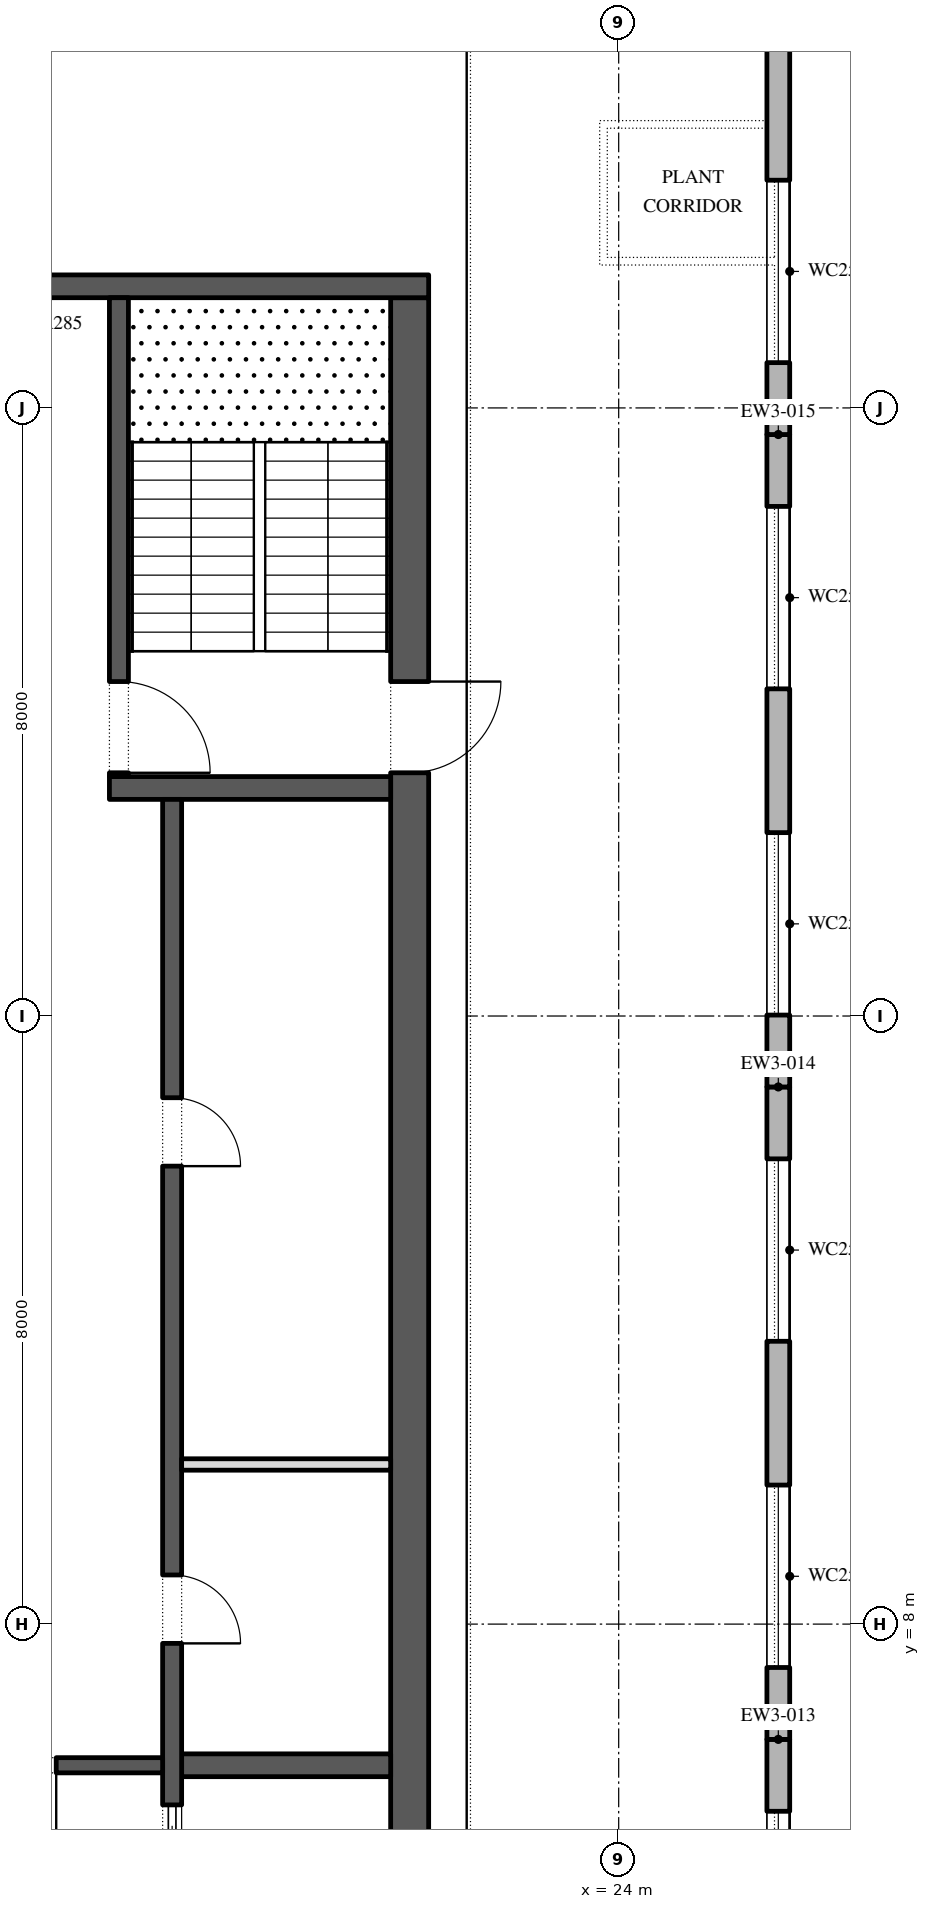
"""IFC4 building model, lengths in metres.
Left out: names, types, materials, properties, quantities, classifications, styles, units other than length and angle.
Written with IfcOpenShell. Run it as: python <this file> out.ifc"""

import sys

from ifc_helpers import new_model, si_unit, direction, frame, frame_2d, origin, place, context, subcontext, project, spatial, polyline, rectangle, outline, extrude, element, fill, save


model = new_model("IFC4")
c1 = context("Model", 3, precision=1e-05, world=origin(), true_north=direction((0.0, 1.0)))
c2 = subcontext(c1, "Body", "Model", "MODEL_VIEW")
j1 = project(units=[si_unit("LENGTHUNIT", "METRE"), si_unit("PLANEANGLEUNIT", "RADIAN")], contexts=[c1])
p1 = place(None, origin())
s1 = spatial("IfcSite", under=j1, at=p1, CompositionType="ELEMENT")
p2 = place(p1, origin())
s2 = spatial("IfcBuilding", under=s1, at=p2, CompositionType="ELEMENT")
p3 = place(p2, frame((0.0, 0.0, 373.2)))
s3 = spatial("IfcBuildingStorey", under=s2, at=p3, CompositionType="ELEMENT", Elevation=373.2)
p4 = place(p3, frame((26.1, -2.1, 0.0), z_axis=(0.0, 0.0, 1.0), x_axis=(0.0, 1.0, 0.0)))
e1 = element("IfcWall", 1, at=p4, inside=s3, PredefinedType="STANDARD", context=c2, shape_type="SweptSolid", body=[
    extrude(rectangle(XDim=8.583, YDim=0.3, at=frame_2d((4.292, 0.0))), origin(), (0.0, 0.0, 1.0), 4.0),
])
p5 = place(p4, frame((0.946, 0.0, 0.8)))
e2 = element("IfcOpeningElement", 2, at=p5, cuts=e1, PredefinedType="OPENING", context=c2, shape_type="SweptSolid", body=[
    extrude(outline(polyline([(0.0, 0.0), (2.4, 0.0), (2.4, 1.25), (2.377, 1.488), (2.31, 1.717), (2.2, 1.929), (2.051, 2.116), (1.87, 2.272), (1.663, 2.391), (1.437, 2.468), (1.2, 2.5), (0.963, 2.468), (0.737, 2.391), (0.53, 2.272), (0.349, 2.116), (0.2, 1.929), (0.09, 1.717), (0.023, 1.488), (0.0, 1.25), (0.0, 0.0)])), frame((0.0, 0.16, 0.0), z_axis=(0.0, -1.0, 0.0), x_axis=(1.0, 0.0, 0.0)), (0.0, 0.0, 1.0), 0.32),
])
p6 = place(p4, frame((5.238, 0.0, 0.8)))
e3 = element("IfcOpeningElement", 3, at=p6, cuts=e1, PredefinedType="OPENING", context=c2, shape_type="SweptSolid", body=[
    extrude(outline(polyline([(0.0, 0.0), (2.4, 0.0), (2.4, 1.25), (2.377, 1.488), (2.31, 1.717), (2.2, 1.929), (2.051, 2.116), (1.87, 2.272), (1.663, 2.391), (1.437, 2.468), (1.2, 2.5), (0.963, 2.468), (0.737, 2.391), (0.53, 2.272), (0.349, 2.116), (0.2, 1.929), (0.09, 1.717), (0.023, 1.488), (0.0, 1.25), (0.0, 0.0)])), frame((0.0, 0.16, 0.0), z_axis=(0.0, -1.0, 0.0), x_axis=(1.0, 0.0, 0.0)), (0.0, 0.0, 1.0), 0.32),
])
p7 = place(p3, frame((26.1, 6.483, 0.0), z_axis=(0.0, 0.0, 1.0), x_axis=(0.0, 1.0, 0.0)))
e4 = element("IfcWall", 4, at=p7, inside=s3, PredefinedType="STANDARD", context=c2, shape_type="SweptSolid", body=[
    extrude(rectangle(XDim=8.583, YDim=0.3, at=frame_2d((4.292, 0.0))), origin(), (0.0, 0.0, 1.0), 4.0),
])
p8 = place(p7, frame((0.946, 0.0, 0.8)))
e5 = element("IfcOpeningElement", 5, at=p8, cuts=e4, PredefinedType="OPENING", context=c2, shape_type="SweptSolid", body=[
    extrude(outline(polyline([(0.0, 0.0), (2.4, 0.0), (2.4, 1.25), (2.377, 1.488), (2.31, 1.717), (2.2, 1.929), (2.051, 2.116), (1.87, 2.272), (1.663, 2.391), (1.437, 2.468), (1.2, 2.5), (0.963, 2.468), (0.737, 2.391), (0.53, 2.272), (0.349, 2.116), (0.2, 1.929), (0.09, 1.717), (0.023, 1.488), (0.0, 1.25), (0.0, 0.0)])), frame((0.0, 0.16, 0.0), z_axis=(0.0, -1.0, 0.0), x_axis=(1.0, 0.0, 0.0)), (0.0, 0.0, 1.0), 0.32),
])
p9 = place(p7, frame((5.238, 0.0, 0.8)))
e6 = element("IfcOpeningElement", 6, at=p9, cuts=e4, PredefinedType="OPENING", context=c2, shape_type="SweptSolid", body=[
    extrude(outline(polyline([(0.0, 0.0), (2.4, 0.0), (2.4, 1.25), (2.377, 1.488), (2.31, 1.717), (2.2, 1.929), (2.051, 2.116), (1.87, 2.272), (1.663, 2.391), (1.437, 2.468), (1.2, 2.5), (0.963, 2.468), (0.737, 2.391), (0.53, 2.272), (0.349, 2.116), (0.2, 1.929), (0.09, 1.717), (0.023, 1.488), (0.0, 1.25), (0.0, 0.0)])), frame((0.0, 0.16, 0.0), z_axis=(0.0, -1.0, 0.0), x_axis=(1.0, 0.0, 0.0)), (0.0, 0.0, 1.0), 0.32),
])
p10 = place(p3, frame((26.1, 15.067, 0.0), z_axis=(0.0, 0.0, 1.0), x_axis=(0.0, 1.0, 0.0)))
e7 = element("IfcWall", 7, at=p10, inside=s3, PredefinedType="STANDARD", context=c2, shape_type="SweptSolid", body=[
    extrude(rectangle(XDim=8.583, YDim=0.3, at=frame_2d((4.292, 0.0))), origin(), (0.0, 0.0, 1.0), 4.0),
])
p11 = place(p10, frame((0.946, 0.0, 0.8)))
e8 = element("IfcOpeningElement", 8, at=p11, cuts=e7, PredefinedType="OPENING", context=c2, shape_type="SweptSolid", body=[
    extrude(outline(polyline([(0.0, 0.0), (2.4, 0.0), (2.4, 1.25), (2.377, 1.488), (2.31, 1.717), (2.2, 1.929), (2.051, 2.116), (1.87, 2.272), (1.663, 2.391), (1.437, 2.468), (1.2, 2.5), (0.963, 2.468), (0.737, 2.391), (0.53, 2.272), (0.349, 2.116), (0.2, 1.929), (0.09, 1.717), (0.023, 1.488), (0.0, 1.25), (0.0, 0.0)])), frame((0.0, 0.16, 0.0), z_axis=(0.0, -1.0, 0.0), x_axis=(1.0, 0.0, 0.0)), (0.0, 0.0, 1.0), 0.32),
])
p12 = place(p10, frame((5.238, 0.0, 0.8)))
e9 = element("IfcOpeningElement", 9, at=p12, cuts=e7, PredefinedType="OPENING", context=c2, shape_type="SweptSolid", body=[
    extrude(outline(polyline([(0.0, 0.0), (2.4, 0.0), (2.4, 1.25), (2.377, 1.488), (2.31, 1.717), (2.2, 1.929), (2.051, 2.116), (1.87, 2.272), (1.663, 2.391), (1.437, 2.468), (1.2, 2.5), (0.963, 2.468), (0.737, 2.391), (0.53, 2.272), (0.349, 2.116), (0.2, 1.929), (0.09, 1.717), (0.023, 1.488), (0.0, 1.25), (0.0, 0.0)])), frame((0.0, 0.16, 0.0), z_axis=(0.0, -1.0, 0.0), x_axis=(1.0, 0.0, 0.0)), (0.0, 0.0, 1.0), 0.32),
])
p13 = place(p3, frame((26.1, 23.65, 0.0), z_axis=(0.0, 0.0, 1.0), x_axis=(0.0, 1.0, 0.0)))
e10 = element("IfcWall", 10, at=p13, inside=s3, PredefinedType="STANDARD", context=c2, shape_type="SweptSolid", body=[
    extrude(rectangle(XDim=8.583, YDim=0.3, at=frame_2d((4.292, 0.0))), origin(), (0.0, 0.0, 1.0), 4.0),
])
p14 = place(p13, frame((0.946, 0.0, 0.8)))
e11 = element("IfcOpeningElement", 11, at=p14, cuts=e10, PredefinedType="OPENING", context=c2, shape_type="SweptSolid", body=[
    extrude(outline(polyline([(0.0, 0.0), (2.4, 0.0), (2.4, 1.25), (2.377, 1.488), (2.31, 1.717), (2.2, 1.929), (2.051, 2.116), (1.87, 2.272), (1.663, 2.391), (1.437, 2.468), (1.2, 2.5), (0.963, 2.468), (0.737, 2.391), (0.53, 2.272), (0.349, 2.116), (0.2, 1.929), (0.09, 1.717), (0.023, 1.488), (0.0, 1.25), (0.0, 0.0)])), frame((0.0, 0.16, 0.0), z_axis=(0.0, -1.0, 0.0), x_axis=(1.0, 0.0, 0.0)), (0.0, 0.0, 1.0), 0.32),
])
p15 = place(p13, frame((5.238, 0.0, 0.8)))
e12 = element("IfcOpeningElement", 12, at=p15, cuts=e10, PredefinedType="OPENING", context=c2, shape_type="SweptSolid", body=[
    extrude(outline(polyline([(0.0, 0.0), (2.4, 0.0), (2.4, 1.25), (2.377, 1.488), (2.31, 1.717), (2.2, 1.929), (2.051, 2.116), (1.87, 2.272), (1.663, 2.391), (1.437, 2.468), (1.2, 2.5), (0.963, 2.468), (0.737, 2.391), (0.53, 2.272), (0.349, 2.116), (0.2, 1.929), (0.09, 1.717), (0.023, 1.488), (0.0, 1.25), (0.0, 0.0)])), frame((0.0, 0.16, 0.0), z_axis=(0.0, -1.0, 0.0), x_axis=(1.0, 0.0, 0.0)), (0.0, 0.0, 1.0), 0.32),
])
p16 = place(p3, frame((21.25, -2.45, 0.0), z_axis=(0.0, 0.0, 1.0), x_axis=(0.0, 1.0, 0.0)))
e13 = element("IfcWall", 13, at=p16, inside=s3, PredefinedType="SHEAR", context=c2, shape_type="SweptSolid", body=[
    extrude(rectangle(XDim=27.9, YDim=0.5, at=frame_2d((13.95, 0.0))), origin(), (0.0, 0.0, 1.0), 4.0),
])
p17 = place(p16, frame((5.05, 0.0, 0.0)))
e14 = element("IfcOpeningElement", 14, at=p17, cuts=e13, PredefinedType="OPENING", context=c2, shape_type="SweptSolid", body=[
    extrude(rectangle(XDim=1.2, YDim=2.1, at=frame_2d((0.6, 1.05))), frame((0.0, 0.26, 0.0), z_axis=(0.0, -1.0, 0.0), x_axis=(1.0, 0.0, 0.0)), (0.0, 0.0, 1.0), 0.52),
])
p18 = place(p16, frame((21.65, 0.0, 0.0)))
e15 = element("IfcOpeningElement", 15, at=p18, cuts=e13, PredefinedType="OPENING", context=c2, shape_type="SweptSolid", body=[
    extrude(rectangle(XDim=1.2, YDim=2.1, at=frame_2d((0.6, 1.05))), frame((0.0, 0.26, 0.0), z_axis=(0.0, -1.0, 0.0), x_axis=(1.0, 0.0, 0.0)), (0.0, 0.0, 1.0), 0.52),
])
p19 = place(p3, frame((10.5, 25.6, 0.0), z_axis=(0.0, 0.0, 1.0), x_axis=(1.0, 0.0, 0.0)))
e16 = element("IfcWall", 16, at=p19, inside=s3, PredefinedType="SHEAR", context=c2, shape_type="SweptSolid", body=[
    extrude(rectangle(XDim=11.0, YDim=0.3, at=frame_2d((5.5, 0.0))), origin(), (0.0, 0.0, 1.0), 4.0),
])
p20 = place(p3, frame((17.3, 19.0, 0.0), z_axis=(0.0, 0.0, 1.0), x_axis=(1.0, 0.0, 0.0)))
e17 = element("IfcWall", 17, at=p20, inside=s3, PredefinedType="SHEAR", context=c2, shape_type="SweptSolid", body=[
    extrude(rectangle(XDim=3.7, YDim=0.3, at=frame_2d((1.85, 0.0))), origin(), (0.0, 0.0, 1.0), 4.0),
])
p21 = place(p3, frame((17.425, 19.15, 0.0), z_axis=(0.0, 0.0, 1.0), x_axis=(0.0, 1.0, 0.0)))
e18 = element("IfcWall", 18, at=p21, inside=s3, PredefinedType="SHEAR", context=c2, shape_type="SweptSolid", body=[
    extrude(rectangle(XDim=6.3, YDim=0.25, at=frame_2d((3.15, 0.0))), origin(), (0.0, 0.0, 1.0), 4.0),
])
p22 = place(p21, frame((0.05, 0.0, 0.0)))
e19 = element("IfcOpeningElement", 19, at=p22, cuts=e18, PredefinedType="OPENING", context=c2, shape_type="SweptSolid", body=[
    extrude(rectangle(XDim=1.2, YDim=2.1, at=frame_2d((0.6, 1.05))), frame((0.0, 0.135, 0.0), z_axis=(0.0, -1.0, 0.0), x_axis=(1.0, 0.0, 0.0)), (0.0, 0.0, 1.0), 0.27),
])
p23 = place(p3, frame((18.25, 6.143, 0.0), z_axis=(0.0, 0.0, 1.0), x_axis=(1.0, 0.0, 0.0)))
e20 = element("IfcWall", 20, at=p23, inside=s3, PredefinedType="SHEAR", context=c2, shape_type="SweptSolid", body=[
    extrude(rectangle(XDim=2.75, YDim=0.3, at=frame_2d((1.375, 0.0))), origin(), (0.0, 0.0, 1.0), 4.0),
])
p24 = place(p3, frame((18.125, 4.15, 0.0), z_axis=(0.0, 0.0, 1.0), x_axis=(0.0, 1.0, 0.0)))
e21 = element("IfcWall", 21, at=p24, inside=s3, PredefinedType="SHEAR", context=c2, shape_type="SweptSolid", body=[
    extrude(rectangle(XDim=14.7, YDim=0.25, at=frame_2d((7.35, 0.0))), origin(), (0.0, 0.0, 1.0), 4.0),
])
p25 = place(p24, frame((3.596, 0.0, 0.0)))
e22 = element("IfcOpeningElement", 22, at=p25, cuts=e21, PredefinedType="OPENING", context=c2, shape_type="SweptSolid", body=[
    extrude(rectangle(XDim=0.9, YDim=2.1, at=frame_2d((0.45, 1.05))), frame((0.0, 0.135, 0.0), z_axis=(0.0, -1.0, 0.0), x_axis=(1.0, 0.0, 0.0)), (0.0, 0.0, 1.0), 0.27),
])
p26 = place(p24, frame((9.875, 0.0, 0.0)))
e23 = element("IfcOpeningElement", 23, at=p26, cuts=e21, PredefinedType="OPENING", context=c2, shape_type="SweptSolid", body=[
    extrude(rectangle(XDim=0.9, YDim=2.1, at=frame_2d((0.45, 1.05))), frame((0.0, 0.135, 0.0), z_axis=(0.0, -1.0, 0.0), x_axis=(1.0, 0.0, 0.0)), (0.0, 0.0, 1.0), 0.27),
])
p27 = place(p24, frame((0.371, 0.0, 0.0)))
e24 = element("IfcOpeningElement", 24, at=p27, cuts=e21, PredefinedType="OPENING", context=c2, shape_type="SweptSolid", body=[
    extrude(rectangle(XDim=1.1, YDim=2.1, at=frame_2d((0.55, 1.05))), frame((0.0, 0.135, 0.0), z_axis=(0.0, -1.0, 0.0), x_axis=(1.0, 0.0, 0.0)), (0.0, 0.0, 1.0), 0.27),
])
p28 = place(p3, frame((18.25, 10.1, 0.0), z_axis=(0.0, 0.0, 1.0), x_axis=(1.0, 0.0, 0.0)))
e25 = element("IfcWall", 25, at=p28, inside=s3, PredefinedType="PARTITIONING", context=c2, shape_type="SweptSolid", body=[
    extrude(rectangle(XDim=2.75, YDim=0.15, at=frame_2d((1.375, 0.0))), origin(), (0.0, 0.0, 1.0), 4.0),
])
p29 = place(p3, frame((14.0, 6.143, 0.0), z_axis=(0.0, 0.0, 1.0), x_axis=(1.0, 0.0, 0.0)))
e26 = element("IfcWall", 26, at=p29, inside=s3, PredefinedType="SHEAR", context=c2, shape_type="SweptSolid", body=[
    extrude(rectangle(XDim=4.0, YDim=0.2, at=frame_2d((2.0, 0.0))), origin(), (0.0, 0.0, 1.0), 4.0),
])
p30 = place(p29, frame((1.4, 0.0, 0.0)))
e27 = element("IfcOpeningElement", 27, at=p30, cuts=e26, PredefinedType="OPENING", context=c2, shape_type="SweptSolid", body=[
    extrude(rectangle(XDim=1.2, YDim=2.1, at=frame_2d((0.6, 1.05))), frame((0.0, 0.11, 0.0), z_axis=(0.0, -1.0, 0.0), x_axis=(1.0, 0.0, 0.0)), (0.0, 0.0, 1.0), 0.22),
])
p31 = place(p6, origin())
e28 = element("IfcWindow", 28, at=p31, inside=s3, PartitioningType="DOUBLE_PANEL_VERTICAL", PredefinedType="WINDOW", context=c2, shape_type="SweptSolid", body=[
    extrude(outline(polyline([(0.0, 0.0), (2.4, 0.0), (2.4, 1.25), (2.377, 1.488), (2.31, 1.717), (2.2, 1.929), (2.051, 2.116), (1.87, 2.272), (1.663, 2.391), (1.437, 2.468), (1.2, 2.5), (0.963, 2.468), (0.737, 2.391), (0.53, 2.272), (0.349, 2.116), (0.2, 1.929), (0.09, 1.717), (0.023, 1.488), (0.0, 1.25), (0.0, 0.0)])), frame((0.0, 0.03, 0.0), z_axis=(0.0, -1.0, 0.0), x_axis=(1.0, 0.0, 0.0)), (0.0, 0.0, 1.0), 0.06),
])
fill(e3, e28)
p32 = place(p8, origin())
e29 = element("IfcWindow", 29, at=p32, inside=s3, PartitioningType="DOUBLE_PANEL_VERTICAL", PredefinedType="WINDOW", context=c2, shape_type="SweptSolid", body=[
    extrude(outline(polyline([(0.0, 0.0), (2.4, 0.0), (2.4, 1.25), (2.377, 1.488), (2.31, 1.717), (2.2, 1.929), (2.051, 2.116), (1.87, 2.272), (1.663, 2.391), (1.437, 2.468), (1.2, 2.5), (0.963, 2.468), (0.737, 2.391), (0.53, 2.272), (0.349, 2.116), (0.2, 1.929), (0.09, 1.717), (0.023, 1.488), (0.0, 1.25), (0.0, 0.0)])), frame((0.0, 0.03, 0.0), z_axis=(0.0, -1.0, 0.0), x_axis=(1.0, 0.0, 0.0)), (0.0, 0.0, 1.0), 0.06),
])
fill(e5, e29)
p33 = place(p9, origin())
e30 = element("IfcWindow", 30, at=p33, inside=s3, PartitioningType="DOUBLE_PANEL_VERTICAL", PredefinedType="WINDOW", context=c2, shape_type="SweptSolid", body=[
    extrude(outline(polyline([(0.0, 0.0), (2.4, 0.0), (2.4, 1.25), (2.377, 1.488), (2.31, 1.717), (2.2, 1.929), (2.051, 2.116), (1.87, 2.272), (1.663, 2.391), (1.437, 2.468), (1.2, 2.5), (0.963, 2.468), (0.737, 2.391), (0.53, 2.272), (0.349, 2.116), (0.2, 1.929), (0.09, 1.717), (0.023, 1.488), (0.0, 1.25), (0.0, 0.0)])), frame((0.0, 0.03, 0.0), z_axis=(0.0, -1.0, 0.0), x_axis=(1.0, 0.0, 0.0)), (0.0, 0.0, 1.0), 0.06),
])
fill(e6, e30)
p34 = place(p11, origin())
e31 = element("IfcWindow", 31, at=p34, inside=s3, PartitioningType="DOUBLE_PANEL_VERTICAL", PredefinedType="WINDOW", context=c2, shape_type="SweptSolid", body=[
    extrude(outline(polyline([(0.0, 0.0), (2.4, 0.0), (2.4, 1.25), (2.377, 1.488), (2.31, 1.717), (2.2, 1.929), (2.051, 2.116), (1.87, 2.272), (1.663, 2.391), (1.437, 2.468), (1.2, 2.5), (0.963, 2.468), (0.737, 2.391), (0.53, 2.272), (0.349, 2.116), (0.2, 1.929), (0.09, 1.717), (0.023, 1.488), (0.0, 1.25), (0.0, 0.0)])), frame((0.0, 0.03, 0.0), z_axis=(0.0, -1.0, 0.0), x_axis=(1.0, 0.0, 0.0)), (0.0, 0.0, 1.0), 0.06),
])
fill(e8, e31)
p35 = place(p12, origin())
e32 = element("IfcWindow", 32, at=p35, inside=s3, PartitioningType="DOUBLE_PANEL_VERTICAL", PredefinedType="WINDOW", context=c2, shape_type="SweptSolid", body=[
    extrude(outline(polyline([(0.0, 0.0), (2.4, 0.0), (2.4, 1.25), (2.377, 1.488), (2.31, 1.717), (2.2, 1.929), (2.051, 2.116), (1.87, 2.272), (1.663, 2.391), (1.437, 2.468), (1.2, 2.5), (0.963, 2.468), (0.737, 2.391), (0.53, 2.272), (0.349, 2.116), (0.2, 1.929), (0.09, 1.717), (0.023, 1.488), (0.0, 1.25), (0.0, 0.0)])), frame((0.0, 0.03, 0.0), z_axis=(0.0, -1.0, 0.0), x_axis=(1.0, 0.0, 0.0)), (0.0, 0.0, 1.0), 0.06),
])
fill(e9, e32)
p36 = place(p14, origin())
e33 = element("IfcWindow", 33, at=p36, inside=s3, PartitioningType="DOUBLE_PANEL_VERTICAL", PredefinedType="WINDOW", context=c2, shape_type="SweptSolid", body=[
    extrude(outline(polyline([(0.0, 0.0), (2.4, 0.0), (2.4, 1.25), (2.377, 1.488), (2.31, 1.717), (2.2, 1.929), (2.051, 2.116), (1.87, 2.272), (1.663, 2.391), (1.437, 2.468), (1.2, 2.5), (0.963, 2.468), (0.737, 2.391), (0.53, 2.272), (0.349, 2.116), (0.2, 1.929), (0.09, 1.717), (0.023, 1.488), (0.0, 1.25), (0.0, 0.0)])), frame((0.0, 0.03, 0.0), z_axis=(0.0, -1.0, 0.0), x_axis=(1.0, 0.0, 0.0)), (0.0, 0.0, 1.0), 0.06),
])
fill(e11, e33)
p37 = place(p25, frame((0.9, -0.2, 0.0), z_axis=(0.0, 0.0, 1.0), x_axis=(-1.0, 0.0, 0.0)))
e34 = element("IfcDoor", 34, at=p37, inside=s3, OperationType="SINGLE_SWING_LEFT", PredefinedType="DOOR", context=c2, shape_type="SweptSolid", body=[
    extrude(rectangle(XDim=0.9, YDim=2.1, at=frame_2d((0.45, 1.05))), frame((0.0, -0.075, 0.0), z_axis=(0.0, -1.0, 0.0), x_axis=(1.0, 0.0, 0.0)), (0.0, 0.0, 1.0), 0.05),
])
fill(e22, e34)
p38 = place(p26, frame((0.9, -0.2, 0.0), z_axis=(0.0, 0.0, 1.0), x_axis=(-1.0, 0.0, 0.0)))
e35 = element("IfcDoor", 35, at=p38, inside=s3, OperationType="SINGLE_SWING_LEFT", PredefinedType="DOOR", context=c2, shape_type="SweptSolid", body=[
    extrude(rectangle(XDim=0.9, YDim=2.1, at=frame_2d((0.45, 1.05))), frame((0.0, -0.075, 0.0), z_axis=(0.0, -1.0, 0.0), x_axis=(1.0, 0.0, 0.0)), (0.0, 0.0, 1.0), 0.05),
])
fill(e23, e35)
p39 = place(p27, origin())
e36 = element("IfcDoor", 36, at=p39, inside=s3, OperationType="SLIDING_TO_LEFT", PredefinedType="DOOR", context=c2, shape_type="SweptSolid", body=[
    extrude(rectangle(XDim=1.1, YDim=2.1, at=frame_2d((0.55, 1.05))), frame((0.0, 0.025, 0.0), z_axis=(0.0, -1.0, 0.0), x_axis=(1.0, 0.0, 0.0)), (0.0, 0.0, 1.0), 0.05),
])
fill(e24, e36)
p40 = place(p30, frame((1.2, 0.0, 0.0), z_axis=(0.0, 0.0, 1.0), x_axis=(-1.0, 0.0, 0.0)))
e37 = element("IfcDoor", 37, at=p40, inside=s3, OperationType="SINGLE_SWING_RIGHT", PredefinedType="DOOR", context=c2, shape_type="SweptSolid", body=[
    extrude(rectangle(XDim=1.2, YDim=2.1, at=frame_2d((0.6, 1.05))), frame((0.0, 0.025, 0.0), z_axis=(0.0, -1.0, 0.0), x_axis=(1.0, 0.0, 0.0)), (0.0, 0.0, 1.0), 0.05),
])
fill(e27, e37)
p41 = place(p22, frame((1.2, 0.0, 0.0), z_axis=(0.0, 0.0, 1.0), x_axis=(-1.0, 0.0, 0.0)))
e38 = element("IfcDoor", 38, at=p41, inside=s3, OperationType="SINGLE_SWING_LEFT", PredefinedType="DOOR", context=c2, shape_type="SweptSolid", body=[
    extrude(rectangle(XDim=1.2, YDim=2.1, at=frame_2d((0.6, 1.05))), frame((0.0, 0.025, 0.0), z_axis=(0.0, -1.0, 0.0), x_axis=(1.0, 0.0, 0.0)), (0.0, 0.0, 1.0), 0.05),
])
fill(e19, e38)
p42 = place(p18, frame((1.2, 0.0, 0.0), z_axis=(0.0, 0.0, 1.0), x_axis=(-1.0, 0.0, 0.0)))
e39 = element("IfcDoor", 39, at=p42, inside=s3, OperationType="SINGLE_SWING_RIGHT", PredefinedType="DOOR", context=c2, shape_type="SweptSolid", body=[
    extrude(rectangle(XDim=1.2, YDim=2.1, at=frame_2d((0.6, 1.05))), frame((0.0, 0.025, 0.0), z_axis=(0.0, -1.0, 0.0), x_axis=(1.0, 0.0, 0.0)), (0.0, 0.0, 1.0), 0.05),
])
fill(e15, e39)
save(model, sys.argv[1])
